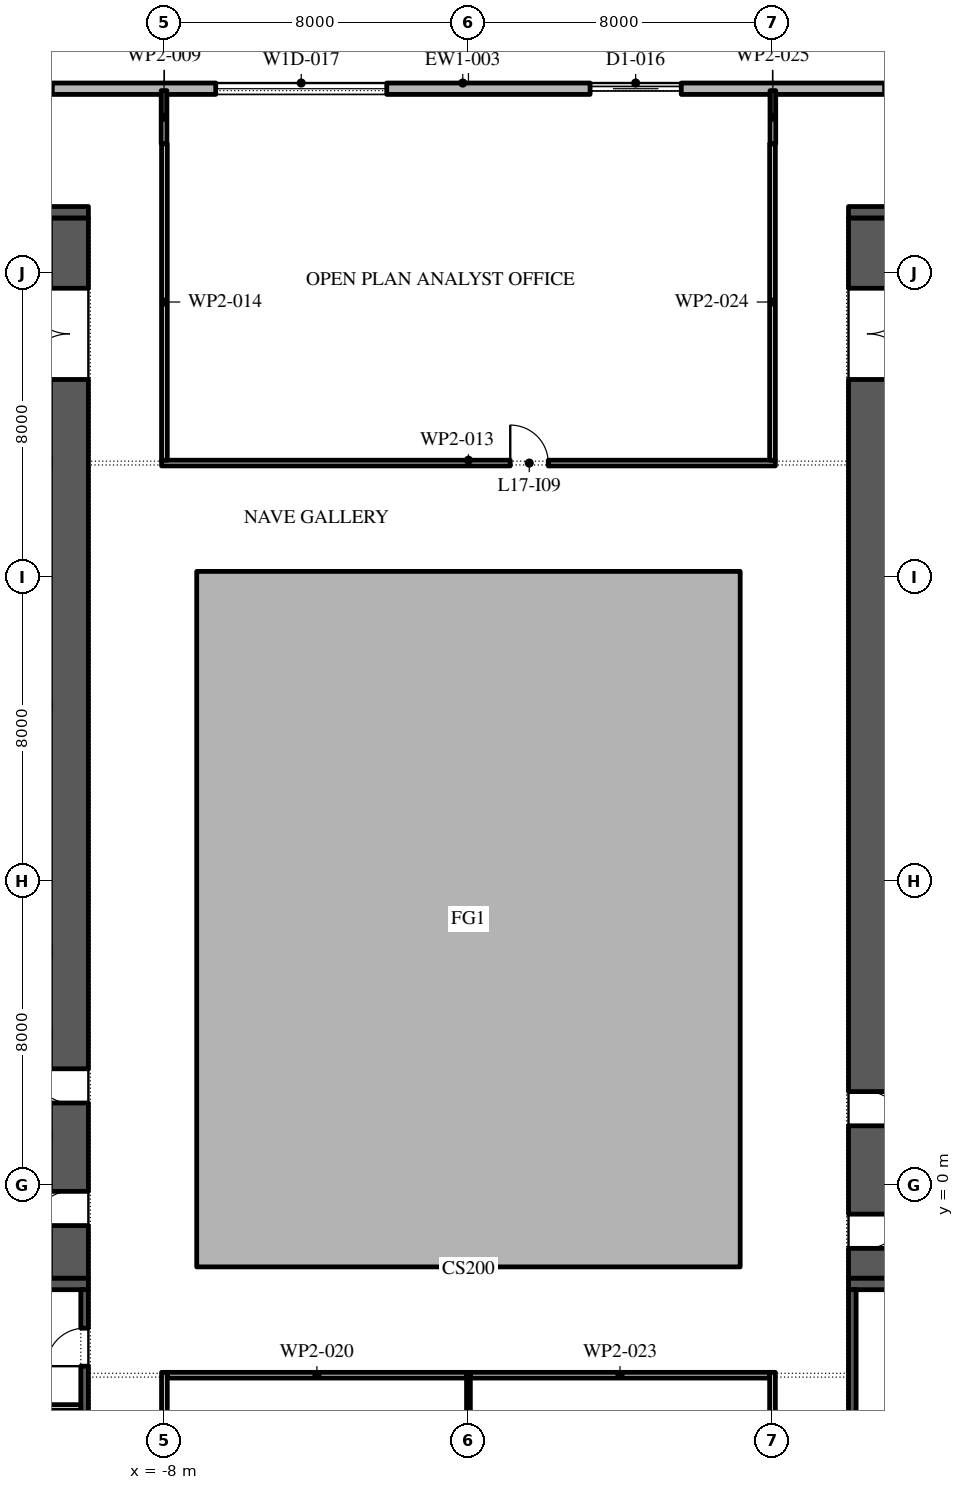
"""IFC4 building model, lengths in metres.
Left out: names, types, materials, properties, quantities, classifications, styles, units other than length and angle.
Written with IfcOpenShell. Run it as: python <this file> out.ifc"""

import sys

from ifc_helpers import new_model, si_unit, direction, frame, frame_2d, origin, place, context, subcontext, project, spatial, polyline, rectangle, outline, extrude, element, fill, save


model = new_model("IFC4")
c1 = context("Model", 3, precision=1e-05, world=origin(), true_north=direction((0.0, 1.0)))
c2 = subcontext(c1, "Body", "Model", "MODEL_VIEW")
j1 = project(units=[si_unit("LENGTHUNIT", "METRE"), si_unit("PLANEANGLEUNIT", "RADIAN")], contexts=[c1])
p1 = place(None, origin())
s1 = spatial("IfcSite", under=j1, at=p1, CompositionType="ELEMENT")
p2 = place(p1, origin())
s2 = spatial("IfcBuilding", under=s1, at=p2, CompositionType="ELEMENT")
p3 = place(p2, frame((0.0, 0.0, 81.6)))
s3 = spatial("IfcBuildingStorey", under=s2, at=p3, CompositionType="ELEMENT", Elevation=81.6)
p4 = place(p3, origin())
e1 = element("IfcWall", 1, at=p4, inside=s3, PredefinedType="STANDARD", context=c2, shape_type="SweptSolid", body=[
    extrude(outline(polyline([(-7.15, -2.15), (7.15, -2.15), (7.15, 16.15), (-7.15, 16.15), (-7.15, -2.15)]), holes=[polyline([(-7.0, -2.0), (-7.0, 16.0), (7.0, 16.0), (7.0, -2.0), (-7.0, -2.0)])]), origin(), (0.0, 0.0, 1.0), 4.0),
])
p5 = place(p3, frame((26.1, 28.85, 0.0), z_axis=(0.0, 0.0, 1.0), x_axis=(-1.0, 0.0, 0.0)))
e2 = element("IfcWall", 2, at=p5, inside=s3, PredefinedType="STANDARD", context=c2, shape_type="SweptSolid", body=[
    extrude(rectangle(XDim=52.5, YDim=0.3, at=frame_2d((26.25, 0.0))), origin(), (0.0, 0.0, 1.0), 4.0),
])
p6 = place(p5, frame((2.0, 0.0, 0.45)))
e3 = element("IfcOpeningElement", 3, at=p6, cuts=e2, PredefinedType="OPENING", context=c2, shape_type="SweptSolid", body=[
    extrude(rectangle(XDim=4.5, YDim=2.875, at=frame_2d((2.25, 1.438))), frame((0.0, 0.16, 0.0), z_axis=(0.0, -1.0, 0.0), x_axis=(1.0, 0.0, 0.0)), (0.0, 0.0, 1.0), 0.32),
])
p7 = place(p5, frame((10.65, 0.0, 0.45)))
e4 = element("IfcOpeningElement", 4, at=p7, cuts=e2, PredefinedType="OPENING", context=c2, shape_type="SweptSolid", body=[
    extrude(rectangle(XDim=4.5, YDim=2.875, at=frame_2d((2.25, 1.438))), frame((0.0, 0.16, 0.0), z_axis=(0.0, -1.0, 0.0), x_axis=(1.0, 0.0, 0.0)), (0.0, 0.0, 1.0), 0.32),
])
p8 = place(p5, frame((20.5, 0.0, 0.0)))
e5 = element("IfcOpeningElement", 5, at=p8, cuts=e2, PredefinedType="OPENING", context=c2, shape_type="SweptSolid", body=[
    extrude(rectangle(XDim=2.4, YDim=3.5, at=frame_2d((1.2, 1.75))), frame((0.0, 0.16, 0.0), z_axis=(0.0, -1.0, 0.0), x_axis=(1.0, 0.0, 0.0)), (0.0, 0.0, 1.0), 0.32),
])
p9 = place(p5, frame((28.25, 0.0, 0.45)))
e6 = element("IfcOpeningElement", 6, at=p9, cuts=e2, PredefinedType="OPENING", context=c2, shape_type="SweptSolid", body=[
    extrude(rectangle(XDim=4.5, YDim=2.875, at=frame_2d((2.25, 1.438))), frame((0.0, 0.16, 0.0), z_axis=(0.0, -1.0, 0.0), x_axis=(1.0, 0.0, 0.0)), (0.0, 0.0, 1.0), 0.32),
])
p10 = place(p5, frame((37.05, 0.0, 0.45)))
e7 = element("IfcOpeningElement", 7, at=p10, cuts=e2, PredefinedType="OPENING", context=c2, shape_type="SweptSolid", body=[
    extrude(rectangle(XDim=4.5, YDim=2.875, at=frame_2d((2.25, 1.438))), frame((0.0, 0.16, 0.0), z_axis=(0.0, -1.0, 0.0), x_axis=(1.0, 0.0, 0.0)), (0.0, 0.0, 1.0), 0.32),
])
p11 = place(p5, frame((45.85, 0.0, 0.45)))
e8 = element("IfcOpeningElement", 8, at=p11, cuts=e2, PredefinedType="OPENING", context=c2, shape_type="SweptSolid", body=[
    extrude(rectangle(XDim=4.5, YDim=2.875, at=frame_2d((2.25, 1.438))), frame((0.0, 0.16, 0.0), z_axis=(0.0, -1.0, 0.0), x_axis=(1.0, 0.0, 0.0)), (0.0, 0.0, 1.0), 0.32),
])
p12 = place(p3, frame((-10.5, -2.45, 0.0), z_axis=(0.0, 0.0, 1.0), x_axis=(0.0, 1.0, 0.0)))
e9 = element("IfcWall", 9, at=p12, inside=s3, PredefinedType="SHEAR", context=c2, shape_type="SweptSolid", body=[
    extrude(rectangle(XDim=27.9, YDim=1.0, at=frame_2d((13.95, 0.0))), origin(), (0.0, 0.0, 1.0), 4.0),
])
p13 = place(p12, frame((23.65, 0.0, 0.0)))
e10 = element("IfcOpeningElement", 10, at=p13, cuts=e9, PredefinedType="OPENING", context=c2, shape_type="SweptSolid", body=[
    extrude(rectangle(XDim=2.4, YDim=2.1, at=frame_2d((1.2, 1.05))), frame((0.0, 0.51, 0.0), z_axis=(0.0, -1.0, 0.0), x_axis=(1.0, 0.0, 0.0)), (0.0, 0.0, 1.0), 1.02),
])
p14 = place(p12, frame((1.387, 0.0, 0.0)))
e11 = element("IfcOpeningElement", 11, at=p14, cuts=e9, PredefinedType="OPENING", context=c2, shape_type="SweptSolid", body=[
    extrude(rectangle(XDim=0.9, YDim=2.1, at=frame_2d((0.45, 1.05))), frame((0.0, 0.51, 0.0), z_axis=(0.0, -1.0, 0.0), x_axis=(1.0, 0.0, 0.0)), (0.0, 0.0, 1.0), 1.02),
])
p15 = place(p12, frame((4.613, 0.0, 0.0)))
e12 = element("IfcOpeningElement", 12, at=p15, cuts=e9, PredefinedType="OPENING", context=c2, shape_type="SweptSolid", body=[
    extrude(rectangle(XDim=0.9, YDim=2.1, at=frame_2d((0.45, 1.05))), frame((0.0, 0.51, 0.0), z_axis=(0.0, -1.0, 0.0), x_axis=(1.0, 0.0, 0.0)), (0.0, 0.0, 1.0), 1.02),
])
for number, where, z_axis, x_axis in (
    (13, (-22.0, -2.6, 0.0), (0.0, 0.0, 1.0), (1.0, 0.0, 0.0)),
    (14, (-22.0, 25.6, 0.0), (0.0, 0.0, 1.0), (1.0, 0.0, 0.0)),
):
    element("IfcWall", number, at=place(p3, frame(where, z_axis=z_axis, x_axis=x_axis)), inside=s3, PredefinedType="SHEAR", context=c2, shape_type="SweptSolid", body=[
        extrude(rectangle(XDim=12.0, YDim=0.3, at=frame_2d((6.0, 0.0))), origin(), (0.0, 0.0, 1.0), 4.0),
    ])
p16 = place(p3, frame((-10.1, -15.8, 0.0), z_axis=(0.0, 0.0, 1.0), x_axis=(0.0, 1.0, 0.0)))
e15 = element("IfcWall", 15, at=p16, inside=s3, PredefinedType="SHEAR", context=c2, shape_type="SweptSolid", body=[
    extrude(rectangle(XDim=13.05, YDim=0.2, at=frame_2d((6.525, 0.0))), origin(), (0.0, 0.0, 1.0), 4.0),
])
p17 = place(p16, frame((4.488, 0.0, 0.0)))
e16 = element("IfcOpeningElement", 16, at=p17, cuts=e15, PredefinedType="OPENING", context=c2, shape_type="SweptSolid", body=[
    extrude(rectangle(XDim=0.9, YDim=2.1, at=frame_2d((0.45, 1.05))), frame((0.0, 0.11, 0.0), z_axis=(0.0, -1.0, 0.0), x_axis=(1.0, 0.0, 0.0)), (0.0, 0.0, 1.0), 0.22),
])
p18 = place(p16, frame((11.038, 0.0, 0.0)))
e17 = element("IfcOpeningElement", 17, at=p18, cuts=e15, PredefinedType="OPENING", context=c2, shape_type="SweptSolid", body=[
    extrude(rectangle(XDim=1.0, YDim=2.1, at=frame_2d((0.5, 1.05))), frame((0.0, 0.11, 0.0), z_axis=(0.0, -1.0, 0.0), x_axis=(1.0, 0.0, 0.0)), (0.0, 0.0, 1.0), 0.22),
])
p19 = place(p3, frame((-21.8, -5.85, 0.0), z_axis=(0.0, 0.0, 1.0), x_axis=(1.0, 0.0, 0.0)))
e18 = element("IfcWall", 18, at=p19, inside=s3, PredefinedType="PARTITIONING", context=c2, shape_type="SweptSolid", body=[
    extrude(rectangle(XDim=11.6, YDim=0.15, at=frame_2d((5.8, 0.0))), origin(), (0.0, 0.0, 1.0), 4.0),
])
p20 = place(p3, frame((10.5, -2.45, 0.0), z_axis=(0.0, 0.0, 1.0), x_axis=(0.0, 1.0, 0.0)))
e19 = element("IfcWall", 19, at=p20, inside=s3, PredefinedType="SHEAR", context=c2, shape_type="SweptSolid", body=[
    extrude(rectangle(XDim=27.9, YDim=1.0, at=frame_2d((13.95, 0.0))), origin(), (0.0, 0.0, 1.0), 4.0),
])
p21 = place(p20, frame((23.65, 0.0, 0.0)))
e20 = element("IfcOpeningElement", 20, at=p21, cuts=e19, PredefinedType="OPENING", context=c2, shape_type="SweptSolid", body=[
    extrude(rectangle(XDim=2.4, YDim=2.1, at=frame_2d((1.2, 1.05))), frame((0.0, 0.51, 0.0), z_axis=(0.0, -1.0, 0.0), x_axis=(1.0, 0.0, 0.0)), (0.0, 0.0, 1.0), 1.02),
])
p22 = place(p20, frame((0.788, 0.0, 0.0)))
e21 = element("IfcOpeningElement", 21, at=p22, cuts=e19, PredefinedType="OPENING", context=c2, shape_type="SweptSolid", body=[
    extrude(rectangle(XDim=0.9, YDim=2.1, at=frame_2d((0.45, 1.05))), frame((0.0, 0.51, 0.0), z_axis=(0.0, -1.0, 0.0), x_axis=(1.0, 0.0, 0.0)), (0.0, 0.0, 1.0), 1.02),
])
p23 = place(p20, frame((4.012, 0.0, 0.0)))
e22 = element("IfcOpeningElement", 22, at=p23, cuts=e19, PredefinedType="OPENING", context=c2, shape_type="SweptSolid", body=[
    extrude(rectangle(XDim=0.9, YDim=2.1, at=frame_2d((0.45, 1.05))), frame((0.0, 0.51, 0.0), z_axis=(0.0, -1.0, 0.0), x_axis=(1.0, 0.0, 0.0)), (0.0, 0.0, 1.0), 1.02),
])
for number, where, z_axis, x_axis in (
    (23, (10.0, -2.6, 0.0), (0.0, 0.0, 1.0), (1.0, 0.0, 0.0)),
    (24, (10.0, 25.6, 0.0), (0.0, 0.0, 1.0), (1.0, 0.0, 0.0)),
):
    element("IfcWall", number, at=place(p3, frame(where, z_axis=z_axis, x_axis=x_axis)), inside=s3, PredefinedType="SHEAR", context=c2, shape_type="SweptSolid", body=[
        extrude(rectangle(XDim=12.0, YDim=0.3, at=frame_2d((6.0, 0.0))), origin(), (0.0, 0.0, 1.0), 4.0),
    ])
p24 = place(p3, frame((10.1, -15.8, 0.0), z_axis=(0.0, 0.0, 1.0), x_axis=(0.0, 1.0, 0.0)))
e25 = element("IfcWall", 25, at=p24, inside=s3, PredefinedType="SHEAR", context=c2, shape_type="SweptSolid", body=[
    extrude(rectangle(XDim=13.05, YDim=0.2, at=frame_2d((6.525, 0.0))), origin(), (0.0, 0.0, 1.0), 4.0),
])
p25 = place(p24, frame((6.075, 0.0, 0.0)))
e26 = element("IfcOpeningElement", 26, at=p25, cuts=e25, PredefinedType="OPENING", context=c2, shape_type="SweptSolid", body=[
    extrude(rectangle(XDim=0.9, YDim=2.1, at=frame_2d((0.45, 1.05))), frame((0.0, 0.11, 0.0), z_axis=(0.0, -1.0, 0.0), x_axis=(1.0, 0.0, 0.0)), (0.0, 0.0, 1.0), 0.22),
])
p26 = place(p3, frame((-8.01, 28.8, 0.0), z_axis=(0.0, 0.0, 1.0), x_axis=(0.0, -1.0, 0.0)))
e27 = element("IfcWall", 27, at=p26, inside=s3, PredefinedType="PARTITIONING", context=c2, shape_type="SweptSolid", body=[
    extrude(rectangle(XDim=1.4, YDim=0.15, at=frame_2d((0.7, 0.0))), origin(), (0.0, 0.0, 1.0), 4.0),
])
p27 = place(p3, frame((-8.0, -4.925, 0.0), z_axis=(0.0, 0.0, 1.0), x_axis=(0.0, -1.0, 0.0)))
e28 = element("IfcWall", 28, at=p27, inside=s3, PredefinedType="PARTITIONING", context=c2, shape_type="SweptSolid", body=[
    extrude(rectangle(XDim=9.625, YDim=0.15, at=frame_2d((4.812, 0.0))), origin(), (0.0, 0.0, 1.0), 4.0),
])
p28 = place(p27, frame((6.175, 0.0, 0.0)))
e29 = element("IfcOpeningElement", 29, at=p28, cuts=e28, PredefinedType="OPENING", context=c2, shape_type="SweptSolid", body=[
    extrude(rectangle(XDim=1.0, YDim=2.1, at=frame_2d((0.5, 1.05))), frame((0.0, 0.085, 0.0), z_axis=(0.0, -1.0, 0.0), x_axis=(1.0, 0.0, 0.0)), (0.0, 0.0, 1.0), 0.17),
])
p29 = place(p3, frame((-8.075, 19.0, 0.0), z_axis=(0.0, 0.0, 1.0), x_axis=(1.0, 0.0, 0.0)))
e30 = element("IfcWall", 30, at=p29, inside=s3, PredefinedType="PARTITIONING", context=c2, shape_type="SweptSolid", body=[
    extrude(rectangle(XDim=16.15, YDim=0.15, at=frame_2d((8.075, 0.0))), origin(), (0.0, 0.0, 1.0), 4.0),
])
p30 = place(p29, frame((9.175, 0.0, 0.0)))
e31 = element("IfcOpeningElement", 31, at=p30, cuts=e30, PredefinedType="OPENING", context=c2, shape_type="SweptSolid", body=[
    extrude(rectangle(XDim=1.0, YDim=2.1, at=frame_2d((0.5, 1.05))), frame((0.0, 0.085, 0.0), z_axis=(0.0, -1.0, 0.0), x_axis=(1.0, 0.0, 0.0)), (0.0, 0.0, 1.0), 0.17),
])
p31 = place(p3, frame((-8.0, 27.4, 0.0), z_axis=(0.0, 0.0, 1.0), x_axis=(0.0, -1.0, 0.0)))
e32 = element("IfcWall", 32, at=p31, inside=s3, PredefinedType="PARTITIONING", context=c2, shape_type="SweptSolid", body=[
    extrude(rectangle(XDim=8.325, YDim=0.15, at=frame_2d((4.163, 0.0))), origin(), (0.0, 0.0, 1.0), 4.0),
])
p32 = place(p3, frame((0.0, -14.05, 0.0), z_axis=(0.0, 0.0, 1.0), x_axis=(0.0, 1.0, 0.0)))
e33 = element("IfcWall", 33, at=p32, inside=s3, PredefinedType="PARTITIONING", context=c2, shape_type="SweptSolid", body=[
    extrude(rectangle(XDim=9.125, YDim=0.1, at=frame_2d((4.562, 0.0))), origin(), (0.0, 0.0, 1.0), 4.0),
])
p33 = place(p3, frame((-0.05, -5.0, 0.0), z_axis=(0.0, 0.0, 1.0), x_axis=(-1.0, 0.0, 0.0)))
e34 = element("IfcWall", 34, at=p33, inside=s3, PredefinedType="PARTITIONING", context=c2, shape_type="SweptSolid", body=[
    extrude(rectangle(XDim=7.875, YDim=0.15, at=frame_2d((3.938, 0.0))), origin(), (0.0, 0.0, 1.0), 4.0),
])
p34 = place(p3, frame((8.0, -13.95, 0.0), z_axis=(0.0, 0.0, 1.0), x_axis=(0.0, 1.0, 0.0)))
e35 = element("IfcWall", 35, at=p34, inside=s3, PredefinedType="PARTITIONING", context=c2, shape_type="SweptSolid", body=[
    extrude(rectangle(XDim=9.025, YDim=0.15, at=frame_2d((4.512, 0.0))), origin(), (0.0, 0.0, 1.0), 4.0),
])
p35 = place(p34, frame((4.05, 0.0, 0.0)))
e36 = element("IfcOpeningElement", 36, at=p35, cuts=e35, PredefinedType="OPENING", context=c2, shape_type="SweptSolid", body=[
    extrude(rectangle(XDim=1.0, YDim=2.1, at=frame_2d((0.5, 1.05))), frame((0.0, 0.085, 0.0), z_axis=(0.0, -1.0, 0.0), x_axis=(1.0, 0.0, 0.0)), (0.0, 0.0, 1.0), 0.17),
])
p36 = place(p3, frame((7.925, -5.0, 0.0), z_axis=(0.0, 0.0, 1.0), x_axis=(-1.0, 0.0, 0.0)))
e37 = element("IfcWall", 37, at=p36, inside=s3, PredefinedType="PARTITIONING", context=c2, shape_type="SweptSolid", body=[
    extrude(rectangle(XDim=7.875, YDim=0.15, at=frame_2d((3.938, 0.0))), origin(), (0.0, 0.0, 1.0), 4.0),
])
p37 = place(p3, frame((8.0, 19.075, 0.0), z_axis=(0.0, 0.0, 1.0), x_axis=(0.0, 1.0, 0.0)))
e38 = element("IfcWall", 38, at=p37, inside=s3, PredefinedType="PARTITIONING", context=c2, shape_type="SweptSolid", body=[
    extrude(rectangle(XDim=8.325, YDim=0.15, at=frame_2d((4.163, 0.0))), origin(), (0.0, 0.0, 1.0), 4.0),
])
p38 = place(p3, frame((8.01, 27.4, 0.0), z_axis=(0.0, 0.0, 1.0), x_axis=(0.0, 1.0, 0.0)))
e39 = element("IfcWall", 39, at=p38, inside=s3, PredefinedType="PARTITIONING", context=c2, shape_type="SweptSolid", body=[
    extrude(rectangle(XDim=1.4, YDim=0.15, at=frame_2d((0.7, 0.0))), origin(), (0.0, 0.0, 1.0), 4.0),
])
p39 = place(p8, origin())
e40 = element("IfcDoor", 40, at=p39, inside=s3, OperationType="DOUBLE_DOOR_SLIDING", PredefinedType="DOOR", context=c2, shape_type="SweptSolid", body=[
    extrude(rectangle(XDim=2.4, YDim=3.5, at=frame_2d((1.2, 1.75))), frame((0.0, 0.025, 0.0), z_axis=(0.0, -1.0, 0.0), x_axis=(1.0, 0.0, 0.0)), (0.0, 0.0, 1.0), 0.05),
])
fill(e5, e40)
p40 = place(p9, origin())
e41 = element("IfcWindow", 41, at=p40, inside=s3, PartitioningType="DOUBLE_PANEL_VERTICAL", PredefinedType="WINDOW", context=c2, shape_type="SweptSolid", body=[
    extrude(rectangle(XDim=4.5, YDim=2.875, at=frame_2d((2.25, 1.438))), frame((0.0, 0.03, 0.0), z_axis=(0.0, -1.0, 0.0), x_axis=(1.0, 0.0, 0.0)), (0.0, 0.0, 1.0), 0.06),
])
fill(e6, e41)
p41 = place(p13, origin())
e42 = element("IfcDoor", 42, at=p41, inside=s3, OperationType="DOUBLE_DOOR_SINGLE_SWING", PredefinedType="DOOR", context=c2, shape_type="SweptSolid", body=[
    extrude(rectangle(XDim=2.4, YDim=2.1, at=frame_2d((1.2, 1.05))), frame((0.0, 0.025, 0.0), z_axis=(0.0, -1.0, 0.0), x_axis=(1.0, 0.0, 0.0)), (0.0, 0.0, 1.0), 0.05),
])
fill(e10, e42)
p42 = place(p18, origin())
e43 = element("IfcDoor", 43, at=p42, inside=s3, OperationType="SINGLE_SWING_RIGHT", PredefinedType="DOOR", context=c2, shape_type="SweptSolid", body=[
    extrude(rectangle(XDim=1.0, YDim=2.1, at=frame_2d((0.5, 1.05))), frame((0.0, 0.1, 0.0), z_axis=(0.0, -1.0, 0.0), x_axis=(1.0, 0.0, 0.0)), (0.0, 0.0, 1.0), 0.05),
])
fill(e17, e43)
p43 = place(p21, frame((2.4, 0.0, 0.0), z_axis=(0.0, 0.0, 1.0), x_axis=(-1.0, 0.0, 0.0)))
e44 = element("IfcDoor", 44, at=p43, inside=s3, OperationType="DOUBLE_DOOR_SINGLE_SWING", PredefinedType="DOOR", context=c2, shape_type="SweptSolid", body=[
    extrude(rectangle(XDim=2.4, YDim=2.1, at=frame_2d((1.2, 1.05))), frame((0.0, 0.025, 0.0), z_axis=(0.0, -1.0, 0.0), x_axis=(1.0, 0.0, 0.0)), (0.0, 0.0, 1.0), 0.05),
])
fill(e20, e44)
p44 = place(p30, origin())
e45 = element("IfcDoor", 45, at=p44, inside=s3, OperationType="SINGLE_SWING_RIGHT", PredefinedType="DOOR", context=c2, shape_type="SweptSolid", body=[
    extrude(rectangle(XDim=1.0, YDim=2.1, at=frame_2d((0.5, 1.05))), frame((0.0, 0.025, 0.0), z_axis=(0.0, -1.0, 0.0), x_axis=(1.0, 0.0, 0.0)), (0.0, 0.0, 1.0), 0.05),
])
fill(e31, e45)
save(model, sys.argv[1])
